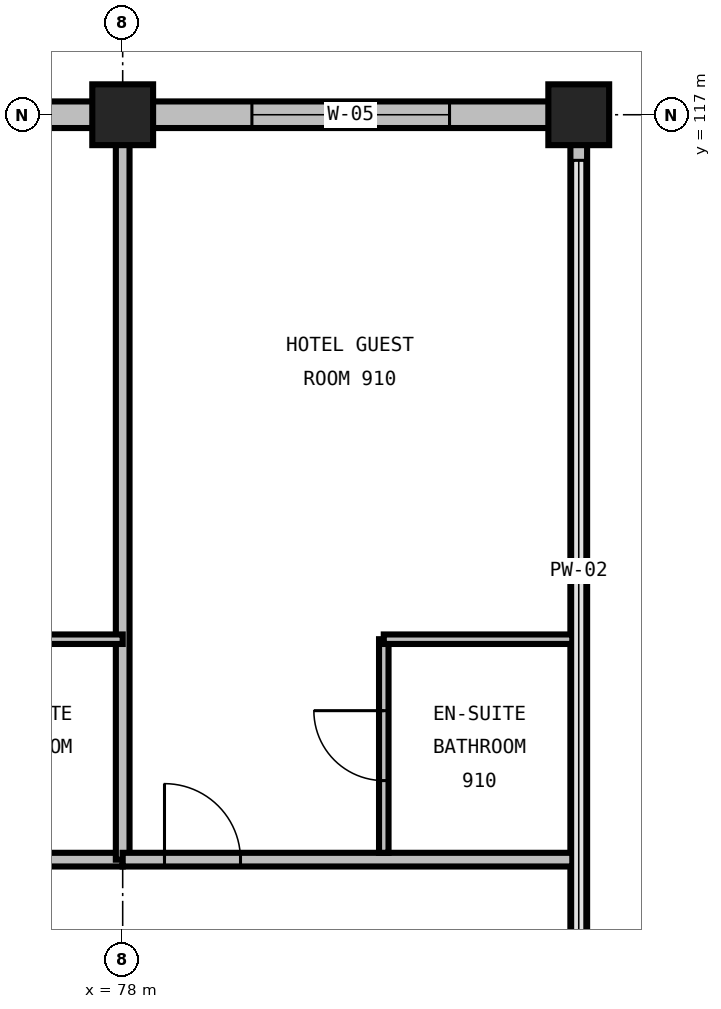
"""IFC4 building model, lengths in metres.
Left out: names, types, materials, properties, quantities, classifications, styles, units other than length and angle.
Written with IfcOpenShell. Run it as: python <this file> out.ifc"""

import sys

from ifc_helpers import new_model, si_unit, direction, frame, frame_2d, origin, origin_2d, place, context, subcontext, project, spatial, rectangle, extrude, element, fill, save


model = new_model("IFC4")
c1 = context("Model", 3, precision=1e-05, world=origin(), true_north=direction((0.0, 1.0)))
c2 = subcontext(c1, "Body", "Model", "MODEL_VIEW")
j1 = project(units=[si_unit("LENGTHUNIT", "METRE"), si_unit("PLANEANGLEUNIT", "RADIAN")], contexts=[c1])
p1 = place(None, origin())
s1 = spatial("IfcSite", under=j1, at=p1, CompositionType="ELEMENT")
p2 = place(p1, origin())
s2 = spatial("IfcBuilding", under=s1, at=p2, CompositionType="ELEMENT")
p3 = place(p2, frame((0.0, 0.0, 42.0)))
s3 = spatial("IfcBuildingStorey", under=s2, at=p3, CompositionType="ELEMENT", Elevation=42.0)
for number, where, z_axis, x_axis in (
    (1, (78.0, 117.0, 0.0), (0.0, 0.0, 1.0), (1.0, 0.0, 0.0)),
    (2, (84.0, 117.0, 0.0), (0.0, 0.0, 1.0), (1.0, 0.0, 0.0)),
):
    element("IfcColumn", number, at=place(p3, frame(where, z_axis=z_axis, x_axis=x_axis)), inside=s3, PredefinedType="COLUMN", context=c2, shape_type="SweptSolid", body=[
        extrude(rectangle(XDim=0.8, YDim=0.8, at=origin_2d()), origin(), (0.0, 0.0, 1.0), 3.6),
    ])
p4 = place(p3, frame((78.0, 117.0, 0.0), z_axis=(0.0, 0.0, 1.0), x_axis=(-1.0, 0.0, 0.0)))
e3 = element("IfcWall", 3, at=p4, inside=s3, PredefinedType="STANDARD", context=c2, shape_type="SweptSolid", body=[
    extrude(rectangle(XDim=12.0, YDim=0.35, at=frame_2d((6.0, 0.0))), origin(), (0.0, 0.0, 1.0), 2.486),
])
p5 = place(p4, frame((1.7, 0.0, 0.72)))
e4 = element("IfcOpeningElement", 4, at=p5, cuts=e3, PredefinedType="OPENING", context=c2, shape_type="SweptSolid", body=[
    extrude(rectangle(XDim=2.6, YDim=1.69, at=frame_2d((1.3, 0.845))), frame((0.0, 0.19, 0.0), z_axis=(0.0, -1.0, 0.0), x_axis=(1.0, 0.0, 0.0)), (0.0, 0.0, 1.0), 0.38),
])
p6 = place(p4, frame((7.625, 0.0, 0.72)))
e5 = element("IfcOpeningElement", 5, at=p6, cuts=e3, PredefinedType="OPENING", context=c2, shape_type="SweptSolid", body=[
    extrude(rectangle(XDim=2.75, YDim=1.69, at=frame_2d((1.375, 0.845))), frame((0.0, 0.19, 0.0), z_axis=(0.0, -1.0, 0.0), x_axis=(1.0, 0.0, 0.0)), (0.0, 0.0, 1.0), 0.38),
])
p7 = place(p3, frame((84.0, 117.0, 0.0), z_axis=(0.0, 0.0, 1.0), x_axis=(-1.0, 0.0, 0.0)))
e6 = element("IfcWall", 6, at=p7, inside=s3, PredefinedType="STANDARD", context=c2, shape_type="SweptSolid", body=[
    extrude(rectangle(XDim=6.0, YDim=0.35, at=frame_2d((3.0, 0.0))), origin(), (0.0, 0.0, 1.0), 2.486),
])
p8 = place(p7, frame((1.7, 0.0, 0.72)))
e7 = element("IfcOpeningElement", 7, at=p8, cuts=e6, PredefinedType="OPENING", context=c2, shape_type="SweptSolid", body=[
    extrude(rectangle(XDim=2.6, YDim=1.69, at=frame_2d((1.3, 0.845))), frame((0.0, 0.19, 0.0), z_axis=(0.0, -1.0, 0.0), x_axis=(1.0, 0.0, 0.0)), (0.0, 0.0, 1.0), 0.38),
])
p9 = place(p3, frame((84.0, 105.0, 0.0), z_axis=(0.0, 0.0, 1.0), x_axis=(0.0, 1.0, 0.0)))
e8 = element("IfcWall", 8, at=p9, inside=s3, PredefinedType="PARAPET", context=c2, shape_type="SweptSolid", body=[
    extrude(rectangle(XDim=12.0, YDim=0.22, at=frame_2d((6.0, 0.0))), origin(), (0.0, 0.0, 1.0), 0.2),
])
p10 = place(p3, frame((72.0, 107.2, 0.0), z_axis=(0.0, 0.0, 1.0), x_axis=(1.0, 0.0, 0.0)))
e9 = element("IfcWall", 9, at=p10, inside=s3, PredefinedType="PARTITIONING", context=c2, shape_type="SweptSolid", body=[
    extrude(rectangle(XDim=6.0, YDim=0.18, at=frame_2d((3.0, 0.0))), origin(), (0.0, 0.0, 1.0), 3.29),
])
p11 = place(p10, frame((0.55, 0.0, 0.0)))
e10 = element("IfcOpeningElement", 10, at=p11, cuts=e9, PredefinedType="OPENING", context=c2, shape_type="SweptSolid", body=[
    extrude(rectangle(XDim=1.0, YDim=2.15, at=frame_2d((0.5, 1.075))), frame((0.0, 0.105, 0.0), z_axis=(0.0, -1.0, 0.0), x_axis=(1.0, 0.0, 0.0)), (0.0, 0.0, 1.0), 0.21),
])
p12 = place(p3, frame((78.0, 107.2, 0.0), z_axis=(0.0, 0.0, 1.0), x_axis=(0.0, 1.0, 0.0)))
e11 = element("IfcWall", 11, at=p12, inside=s3, PredefinedType="PARTITIONING", context=c2, shape_type="SweptSolid", body=[
    extrude(rectangle(XDim=9.625, YDim=0.18, at=frame_2d((4.812, 0.0))), origin(), (0.0, 0.0, 1.0), 2.59),
])
p13 = place(p3, frame((75.48, 110.1, 0.0), z_axis=(0.0, 0.0, 1.0), x_axis=(1.0, 0.0, 0.0)))
e12 = element("IfcWall", 12, at=p13, inside=s3, PredefinedType="PARTITIONING", context=c2, shape_type="SweptSolid", body=[
    extrude(rectangle(XDim=2.52, YDim=0.125, at=frame_2d((1.26, 0.0))), origin(), (0.0, 0.0, 1.0), 3.29),
])
p14 = place(p3, frame((78.0, 107.2, 0.0), z_axis=(0.0, 0.0, 1.0), x_axis=(1.0, 0.0, 0.0)))
e13 = element("IfcWall", 13, at=p14, inside=s3, PredefinedType="PARTITIONING", context=c2, shape_type="SweptSolid", body=[
    extrude(rectangle(XDim=5.915, YDim=0.18, at=frame_2d((2.957, 0.0))), origin(), (0.0, 0.0, 1.0), 3.29),
])
p15 = place(p14, frame((0.55, 0.0, 0.0)))
e14 = element("IfcOpeningElement", 14, at=p15, cuts=e13, PredefinedType="OPENING", context=c2, shape_type="SweptSolid", body=[
    extrude(rectangle(XDim=1.0, YDim=2.15, at=frame_2d((0.5, 1.075))), frame((0.0, 0.105, 0.0), z_axis=(0.0, -1.0, 0.0), x_axis=(1.0, 0.0, 0.0)), (0.0, 0.0, 1.0), 0.21),
])
p16 = place(p3, frame((81.435, 107.29, 0.0), z_axis=(0.0, 0.0, 1.0), x_axis=(0.0, 1.0, 0.0)))
e15 = element("IfcWall", 15, at=p16, inside=s3, PredefinedType="PARTITIONING", context=c2, shape_type="SweptSolid", body=[
    extrude(rectangle(XDim=2.81, YDim=0.125, at=frame_2d((1.405, 0.0))), origin(), (0.0, 0.0, 1.0), 3.29),
])
p17 = place(p16, frame((0.95, 0.0, 0.0)))
e16 = element("IfcOpeningElement", 16, at=p17, cuts=e15, PredefinedType="OPENING", context=c2, shape_type="SweptSolid", body=[
    extrude(rectangle(XDim=0.92, YDim=2.1, at=frame_2d((0.46, 1.05))), frame((0.0, 0.077, 0.0), z_axis=(0.0, -1.0, 0.0), x_axis=(1.0, 0.0, 0.0)), (0.0, 0.0, 1.0), 0.155),
])
p18 = place(p3, frame((81.435, 110.1, 0.0), z_axis=(0.0, 0.0, 1.0), x_axis=(1.0, 0.0, 0.0)))
e17 = element("IfcWall", 17, at=p18, inside=s3, PredefinedType="PARTITIONING", context=c2, shape_type="SweptSolid", body=[
    extrude(rectangle(XDim=2.48, YDim=0.125, at=frame_2d((1.24, 0.0))), origin(), (0.0, 0.0, 1.0), 3.29),
])
p19 = place(p8, origin())
e18 = element("IfcWindow", 18, at=p19, inside=s3, PartitioningType="DOUBLE_PANEL_VERTICAL", PredefinedType="WINDOW", context=c2, shape_type="SweptSolid", body=[
    extrude(rectangle(XDim=2.6, YDim=1.69, at=frame_2d((1.3, 0.845))), frame((0.0, 0.03, 0.0), z_axis=(0.0, -1.0, 0.0), x_axis=(1.0, 0.0, 0.0)), (0.0, 0.0, 1.0), 0.06),
])
fill(e7, e18)
p20 = place(p15, origin())
e19 = element("IfcDoor", 19, at=p20, inside=s3, OperationType="SINGLE_SWING_LEFT", PredefinedType="DOOR", context=c2, shape_type="SweptSolid", body=[
    extrude(rectangle(XDim=1.0, YDim=2.15, at=frame_2d((0.5, 1.075))), frame((0.0, 0.025, 0.0), z_axis=(0.0, -1.0, 0.0), x_axis=(1.0, 0.0, 0.0)), (0.0, 0.0, 1.0), 0.05),
])
fill(e14, e19)
p21 = place(p17, origin())
e20 = element("IfcDoor", 20, at=p21, inside=s3, OperationType="SINGLE_SWING_RIGHT", PredefinedType="DOOR", context=c2, shape_type="SweptSolid", body=[
    extrude(rectangle(XDim=0.92, YDim=2.1, at=frame_2d((0.46, 1.05))), frame((0.0, 0.025, 0.0), z_axis=(0.0, -1.0, 0.0), x_axis=(1.0, 0.0, 0.0)), (0.0, 0.0, 1.0), 0.05),
])
fill(e16, e20)
save(model, sys.argv[1])
